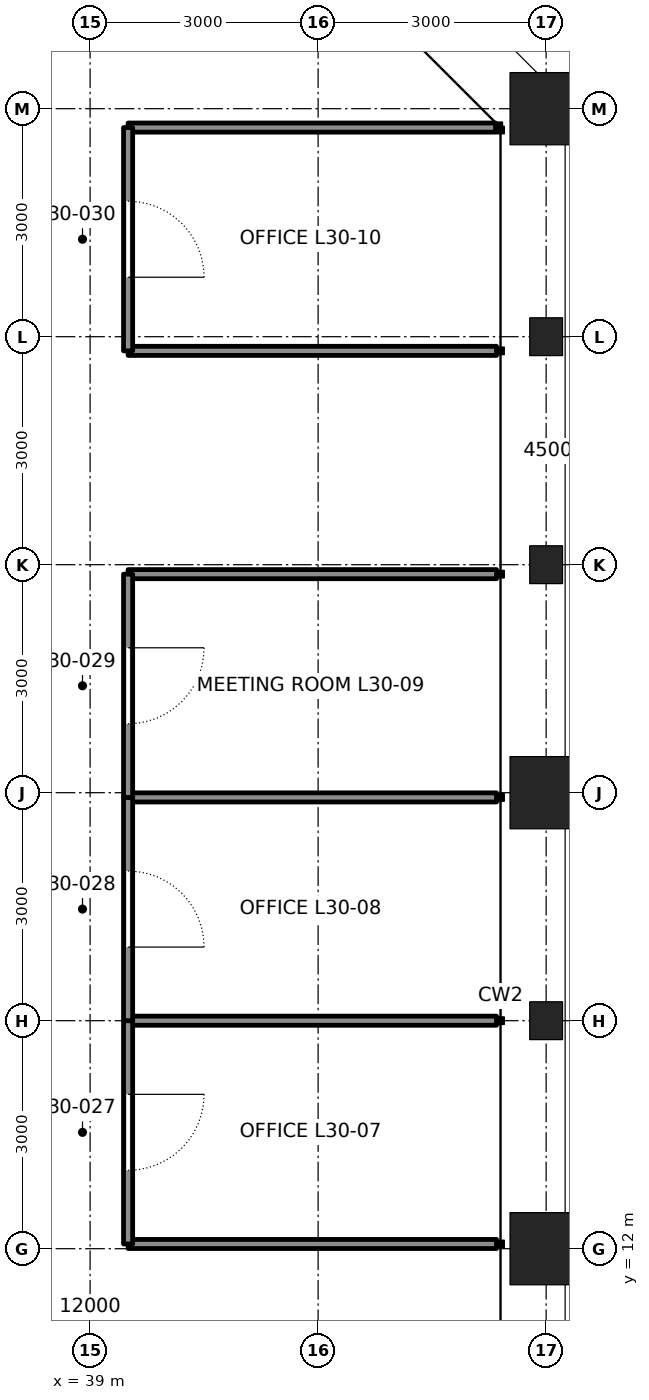
"""IFC4 building model, lengths in metres.
Left out: names, types, materials, properties, quantities, classifications, styles, units other than length and angle.
Written with IfcOpenShell. Run it as: python <this file> out.ifc"""

import sys

from ifc_helpers import new_model, si_unit, direction, frame, frame_2d, origin, origin_2d, place, context, subcontext, project, spatial, rectangle, hollow_rectangle, i_section, extrude, element, fill, save


model = new_model("IFC4")
c1 = context("Model", 3, precision=1e-05, world=origin(), true_north=direction((0.0, 1.0)))
c2 = subcontext(c1, "Body", "Model", "MODEL_VIEW")
j1 = project(units=[si_unit("LENGTHUNIT", "METRE"), si_unit("PLANEANGLEUNIT", "RADIAN")], contexts=[c1])
p1 = place(None, origin())
s1 = spatial("IfcSite", under=j1, at=p1, CompositionType="ELEMENT")
p2 = place(p1, origin())
s2 = spatial("IfcBuilding", under=s1, at=p2, CompositionType="ELEMENT")
p3 = place(p2, frame((0.0, 0.0, 140.4)))
s3 = spatial("IfcBuildingStorey", under=s2, at=p3, CompositionType="ELEMENT", Elevation=140.4)
p4 = place(p3, frame((45.0, 12.0, 0.0), z_axis=(0.0, 0.0, 1.0), x_axis=(1.0, 0.0, 0.0)))
e1 = element("IfcColumn", 1, at=p4, inside=s3, PredefinedType="COLUMN", context=c2, shape_type="SweptSolid", body=[
    extrude(hollow_rectangle(XDim=0.95, YDim=0.95, WallThickness=0.11, at=origin_2d()), origin(), (0.0, 0.0, 1.0), 4.2),
])
p5 = place(p3, frame((45.0, 15.0, 0.0), z_axis=(0.0, 0.0, 1.0), x_axis=(1.0, 0.0, 0.0)))
e2 = element("IfcColumn", 2, at=p5, inside=s3, PredefinedType="COLUMN", context=c2, shape_type="SweptSolid", body=[
    extrude(i_section(OverallWidth=0.432, OverallDepth=0.498, WebThickness=0.056, FlangeThickness=0.089, at=origin_2d()), origin(), (0.0, 0.0, 1.0), 4.2),
])
p6 = place(p3, frame((45.0, 18.0, 0.0), z_axis=(0.0, 0.0, 1.0), x_axis=(1.0, 0.0, 0.0)))
e3 = element("IfcColumn", 3, at=p6, inside=s3, PredefinedType="COLUMN", context=c2, shape_type="SweptSolid", body=[
    extrude(hollow_rectangle(XDim=0.95, YDim=0.95, WallThickness=0.11, at=origin_2d()), origin(), (0.0, 0.0, 1.0), 4.2),
])
for number, where, z_axis, x_axis in (
    (4, (45.0, 21.0, 0.0), (0.0, 0.0, 1.0), (1.0, 0.0, 0.0)),
    (5, (45.0, 24.0, 0.0), (0.0, 0.0, 1.0), (1.0, 0.0, 0.0)),
):
    element("IfcColumn", number, at=place(p3, frame(where, z_axis=z_axis, x_axis=x_axis)), inside=s3, PredefinedType="COLUMN", context=c2, shape_type="SweptSolid", body=[
        extrude(i_section(OverallWidth=0.432, OverallDepth=0.498, WebThickness=0.056, FlangeThickness=0.089, at=origin_2d()), origin(), (0.0, 0.0, 1.0), 4.2),
    ])
p7 = place(p3, frame((45.0, 27.0, 0.0), z_axis=(0.0, 0.0, 1.0), x_axis=(1.0, 0.0, 0.0)))
e6 = element("IfcColumn", 6, at=p7, inside=s3, PredefinedType="COLUMN", context=c2, shape_type="SweptSolid", body=[
    extrude(hollow_rectangle(XDim=0.95, YDim=0.95, WallThickness=0.095, at=origin_2d()), origin(), (0.0, 0.0, 1.0), 4.2),
])
p8 = place(p3, frame((44.347, 12.062, 0.0), z_axis=(0.0, 0.0, 1.0), x_axis=(-1.0, 0.0, 0.0)))
e7 = element("IfcWall", 7, at=p8, inside=s3, PredefinedType="PARTITIONING", context=c2, shape_type="SweptSolid", body=[
    extrude(rectangle(XDim=4.847, YDim=0.12, at=frame_2d((2.424, 0.0))), origin(), (0.0, 0.0, 1.0), 3.271),
])
for number, where, z_axis, x_axis in (
    (8, (44.347, 15.0, 0.0), (0.0, 0.0, 1.0), (-1.0, 0.0, 0.0)),
    (9, (44.347, 17.938, 0.0), (0.0, 0.0, 1.0), (-1.0, 0.0, 0.0)),
    (10, (44.347, 20.876, 0.0), (0.0, 0.0, 1.0), (-1.0, 0.0, 0.0)),
):
    element("IfcWall", number, at=place(p3, frame(where, z_axis=z_axis, x_axis=x_axis)), inside=s3, PredefinedType="PARTITIONING", context=c2, shape_type="SweptSolid", body=[
        extrude(rectangle(XDim=4.847, YDim=0.12, at=frame_2d((2.424, 0.0))), origin(), (0.0, 0.0, 1.0), 3.357),
    ])
p9 = place(p3, frame((44.347, 23.814, 0.0), z_axis=(0.0, 0.0, 1.0), x_axis=(-1.0, 0.0, 0.0)))
e11 = element("IfcWall", 11, at=p9, inside=s3, PredefinedType="PARTITIONING", context=c2, shape_type="SweptSolid", body=[
    extrude(rectangle(XDim=4.847, YDim=0.12, at=frame_2d((2.424, 0.0))), origin(), (0.0, 0.0, 1.0), 4.04),
])
p10 = place(p3, frame((44.334, 26.751, 0.0), z_axis=(0.0, 0.0, 1.0), x_axis=(-1.0, 0.0, 0.0)))
e12 = element("IfcWall", 12, at=p10, inside=s3, PredefinedType="PARTITIONING", context=c2, shape_type="SweptSolid", body=[
    extrude(rectangle(XDim=4.834, YDim=0.12, at=frame_2d((2.417, 0.0))), origin(), (0.0, 0.0, 1.0), 4.04),
])
p11 = place(p3, frame((39.5, 12.062, 0.0), z_axis=(0.0, 0.0, 1.0), x_axis=(0.0, 1.0, 0.0)))
e13 = element("IfcWall", 13, at=p11, inside=s3, PredefinedType="PARTITIONING", context=c2, shape_type="SweptSolid", body=[
    extrude(rectangle(XDim=2.938, YDim=0.12, at=frame_2d((1.469, 0.0))), origin(), (0.0, 0.0, 1.0), 4.04),
])
p12 = place(p11, frame((0.969, 0.0, 0.0)))
e14 = element("IfcOpeningElement", 14, at=p12, cuts=e13, PredefinedType="OPENING", context=c2, shape_type="SweptSolid", body=[
    extrude(rectangle(XDim=1.0, YDim=2.4, at=frame_2d((0.5, 1.2))), frame((0.0, 0.07, 0.0), z_axis=(0.0, -1.0, 0.0), x_axis=(1.0, 0.0, 0.0)), (0.0, 0.0, 1.0), 0.14),
])
p13 = place(p3, frame((39.5, 15.0, 0.0), z_axis=(0.0, 0.0, 1.0), x_axis=(0.0, 1.0, 0.0)))
e15 = element("IfcWall", 15, at=p13, inside=s3, PredefinedType="PARTITIONING", context=c2, shape_type="SweptSolid", body=[
    extrude(rectangle(XDim=2.938, YDim=0.12, at=frame_2d((1.469, 0.0))), origin(), (0.0, 0.0, 1.0), 4.04),
])
p14 = place(p13, frame((0.969, 0.0, 0.0)))
e16 = element("IfcOpeningElement", 16, at=p14, cuts=e15, PredefinedType="OPENING", context=c2, shape_type="SweptSolid", body=[
    extrude(rectangle(XDim=1.0, YDim=2.4, at=frame_2d((0.5, 1.2))), frame((0.0, 0.07, 0.0), z_axis=(0.0, -1.0, 0.0), x_axis=(1.0, 0.0, 0.0)), (0.0, 0.0, 1.0), 0.14),
])
p15 = place(p3, frame((39.5, 17.938, 0.0), z_axis=(0.0, 0.0, 1.0), x_axis=(0.0, 1.0, 0.0)))
e17 = element("IfcWall", 17, at=p15, inside=s3, PredefinedType="PARTITIONING", context=c2, shape_type="SweptSolid", body=[
    extrude(rectangle(XDim=2.938, YDim=0.12, at=frame_2d((1.469, 0.0))), origin(), (0.0, 0.0, 1.0), 4.04),
])
p16 = place(p15, frame((0.969, 0.0, 0.0)))
e18 = element("IfcOpeningElement", 18, at=p16, cuts=e17, PredefinedType="OPENING", context=c2, shape_type="SweptSolid", body=[
    extrude(rectangle(XDim=1.0, YDim=2.4, at=frame_2d((0.5, 1.2))), frame((0.0, 0.07, 0.0), z_axis=(0.0, -1.0, 0.0), x_axis=(1.0, 0.0, 0.0)), (0.0, 0.0, 1.0), 0.14),
])
p17 = place(p3, frame((39.5, 23.814, 0.0), z_axis=(0.0, 0.0, 1.0), x_axis=(0.0, 1.0, 0.0)))
e19 = element("IfcWall", 19, at=p17, inside=s3, PredefinedType="PARTITIONING", context=c2, shape_type="SweptSolid", body=[
    extrude(rectangle(XDim=2.938, YDim=0.12, at=frame_2d((1.469, 0.0))), origin(), (0.0, 0.0, 1.0), 4.04),
])
p18 = place(p17, frame((0.969, 0.0, 0.0)))
e20 = element("IfcOpeningElement", 20, at=p18, cuts=e19, PredefinedType="OPENING", context=c2, shape_type="SweptSolid", body=[
    extrude(rectangle(XDim=1.0, YDim=2.4, at=frame_2d((0.5, 1.2))), frame((0.0, 0.07, 0.0), z_axis=(0.0, -1.0, 0.0), x_axis=(1.0, 0.0, 0.0)), (0.0, 0.0, 1.0), 0.14),
])
p19 = place(p12, frame((1.0, 0.0, 0.0), z_axis=(0.0, 0.0, 1.0), x_axis=(-1.0, 0.0, 0.0)))
e21 = element("IfcDoor", 21, at=p19, inside=s3, OperationType="SINGLE_SWING_LEFT", PredefinedType="DOOR", context=c2, shape_type="SweptSolid", body=[
    extrude(rectangle(XDim=1.0, YDim=2.4, at=frame_2d((0.5, 1.2))), frame((0.0, 0.025, 0.0), z_axis=(0.0, -1.0, 0.0), x_axis=(1.0, 0.0, 0.0)), (0.0, 0.0, 1.0), 0.05),
])
fill(e14, e21)
p20 = place(p14, frame((1.0, 0.0, 0.0), z_axis=(0.0, 0.0, 1.0), x_axis=(-1.0, 0.0, 0.0)))
e22 = element("IfcDoor", 22, at=p20, inside=s3, OperationType="SINGLE_SWING_RIGHT", PredefinedType="DOOR", context=c2, shape_type="SweptSolid", body=[
    extrude(rectangle(XDim=1.0, YDim=2.4, at=frame_2d((0.5, 1.2))), frame((0.0, 0.025, 0.0), z_axis=(0.0, -1.0, 0.0), x_axis=(1.0, 0.0, 0.0)), (0.0, 0.0, 1.0), 0.05),
])
fill(e16, e22)
p21 = place(p16, frame((1.0, 0.0, 0.0), z_axis=(0.0, 0.0, 1.0), x_axis=(-1.0, 0.0, 0.0)))
e23 = element("IfcDoor", 23, at=p21, inside=s3, OperationType="SINGLE_SWING_LEFT", PredefinedType="DOOR", context=c2, shape_type="SweptSolid", body=[
    extrude(rectangle(XDim=1.0, YDim=2.4, at=frame_2d((0.5, 1.2))), frame((0.0, 0.025, 0.0), z_axis=(0.0, -1.0, 0.0), x_axis=(1.0, 0.0, 0.0)), (0.0, 0.0, 1.0), 0.05),
])
fill(e18, e23)
p22 = place(p18, frame((1.0, 0.0, 0.0), z_axis=(0.0, 0.0, 1.0), x_axis=(-1.0, 0.0, 0.0)))
e24 = element("IfcDoor", 24, at=p22, inside=s3, OperationType="SINGLE_SWING_RIGHT", PredefinedType="DOOR", context=c2, shape_type="SweptSolid", body=[
    extrude(rectangle(XDim=1.0, YDim=2.4, at=frame_2d((0.5, 1.2))), frame((0.0, 0.025, 0.0), z_axis=(0.0, -1.0, 0.0), x_axis=(1.0, 0.0, 0.0)), (0.0, 0.0, 1.0), 0.05),
])
fill(e20, e24)
save(model, sys.argv[1])
